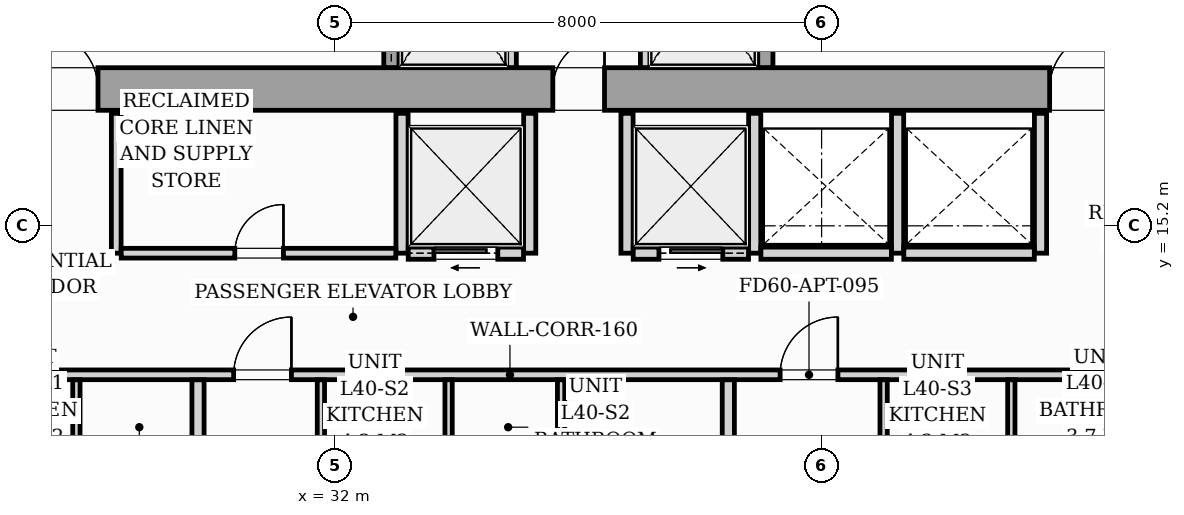
"""IFC4 building model, lengths in metres.
Left out: names, types, materials, properties, quantities, classifications, styles, units other than length and angle.
Written with IfcOpenShell. Run it as: python <this file> out.ifc"""

import sys

from ifc_helpers import new_model, si_unit, direction, frame, frame_2d, origin, origin_2d, place, context, subcontext, project, spatial, rectangle, i_section, extrude, source, transform, mapped, element, fill, save


model = new_model("IFC4")
c1 = context("Model", 3, precision=1e-05, world=origin(), true_north=direction((0.0, 1.0)))
c2 = subcontext(c1, "Body", "Model", "MODEL_VIEW")
j1 = project(units=[si_unit("LENGTHUNIT", "METRE"), si_unit("PLANEANGLEUNIT", "RADIAN")], contexts=[c1])
p1 = place(None, origin())
s1 = spatial("IfcSite", under=j1, at=p1, CompositionType="ELEMENT")
p2 = place(p1, origin())
s2 = spatial("IfcBuilding", under=s1, at=p2, CompositionType="ELEMENT")
p3 = place(p2, frame((0.0, 0.0, 140.6)))
s3 = spatial("IfcBuildingStorey", under=s2, at=p3, CompositionType="ELEMENT", Elevation=140.6)
m1 = source(origin(), c2, "Body", "SweptSolid", [
    extrude(i_section(OverallWidth=0.421, OverallDepth=0.465, WebThickness=0.045, FlangeThickness=0.073, FilletRadius=0.018, at=origin_2d()), origin(), (0.0, 0.0, 1.0), 3.196),
])
for number, where, z_axis, x_axis in (
    (1, (33.12, 17.4, 0.002), (0.0, 0.0, 1.0), (1.0, 0.0, 0.0)),
    (2, (38.88, 17.4, 0.002), (0.0, 0.0, 1.0), (1.0, 0.0, 0.0)),
):
    element("IfcColumn", number, at=place(p3, frame(where, z_axis=z_axis, x_axis=x_axis)), inside=s3, PredefinedType="PILASTER", context=c2, shape_type="MappedRepresentation", body=[
        mapped(m1, transform((0.0, 0.0, 0.0), scale=1.0)),
    ])
p4 = place(p3, frame((26.1, 17.45, 0.0), z_axis=(0.0, 0.0, 1.0), x_axis=(1.0, 0.0, 0.0)))
e3 = element("IfcWall", 3, at=p4, inside=s3, PredefinedType="SHEAR", context=c2, shape_type="SweptSolid", body=[
    extrude(rectangle(XDim=19.8, YDim=0.7, at=frame_2d((9.9, 0.0))), origin(), (0.0, 0.0, 1.0), 3.2),
])
p5 = place(p4, frame((1.05, 0.0, 0.0)))
e4 = element("IfcOpeningElement", 4, at=p5, cuts=e3, PredefinedType="OPENING", context=c2, shape_type="SweptSolid", body=[
    extrude(rectangle(XDim=0.95, YDim=2.06, at=frame_2d((0.475, 1.03))), frame((0.0, 0.36, 0.0), z_axis=(0.0, -1.0, 0.0), x_axis=(1.0, 0.0, 0.0)), (0.0, 0.0, 1.0), 0.72),
])
p6 = place(p4, frame((9.48, 0.0, 0.0)))
e5 = element("IfcOpeningElement", 5, at=p6, cuts=e3, PredefinedType="OPENING", context=c2, shape_type="SweptSolid", body=[
    extrude(rectangle(XDim=0.85, YDim=2.0, at=frame_2d((0.425, 1.0))), frame((0.0, 0.36, 0.0), z_axis=(0.0, -1.0, 0.0), x_axis=(1.0, 0.0, 0.0)), (0.0, 0.0, 1.0), 0.72),
])
p7 = place(p4, frame((17.65, 0.0, 0.0)))
e6 = element("IfcOpeningElement", 6, at=p7, cuts=e3, PredefinedType="OPENING", context=c2, shape_type="SweptSolid", body=[
    extrude(rectangle(XDim=0.95, YDim=2.06, at=frame_2d((0.475, 1.03))), frame((0.0, 0.36, 0.0), z_axis=(0.0, -1.0, 0.0), x_axis=(1.0, 0.0, 0.0)), (0.0, 0.0, 1.0), 0.72),
])
p8 = place(p3, frame((32.925, 17.802, 0.0), z_axis=(0.0, 0.0, 1.0), x_axis=(0.0, 1.0, 0.0)))
e7 = element("IfcWall", 7, at=p8, inside=s3, PredefinedType="SOLIDWALL", context=c2, shape_type="SweptSolid", body=[
    extrude(rectangle(XDim=2.646, YDim=0.25, at=frame_2d((1.323, 0.0))), origin(), (0.0, 0.0, 1.0), 3.2),
])
p9 = place(p8, frame((0.598, 0.0, 0.0)))
e8 = element("IfcOpeningElement", 8, at=p9, cuts=e7, PredefinedType="OPENING", context=c2, shape_type="SweptSolid", body=[
    extrude(rectangle(XDim=1.1, YDim=2.08, at=frame_2d((0.55, 1.04))), frame((0.0, 0.135, 0.0), z_axis=(0.0, -1.0, 0.0), x_axis=(1.0, 0.0, 0.0)), (0.0, 0.0, 1.0), 0.27),
])
for number, where, z_axis, x_axis in (
    (9, (34.9, 17.802, 0.0), (0.0, 0.0, 1.0), (0.0, 1.0, 0.0)),
    (10, (37.1, 17.802, 0.0), (0.0, 0.0, 1.0), (0.0, 1.0, 0.0)),
):
    element("IfcWall", number, at=place(p3, frame(where, z_axis=z_axis, x_axis=x_axis)), inside=s3, PredefinedType="PARTITIONING", context=c2, shape_type="SweptSolid", body=[
        extrude(rectangle(XDim=2.646, YDim=0.16, at=frame_2d((1.323, 0.0))), origin(), (0.0, 0.0, 1.0), 2.94),
    ])
p10 = place(p3, frame((39.075, 17.802, 0.0), z_axis=(0.0, 0.0, 1.0), x_axis=(0.0, 1.0, 0.0)))
e11 = element("IfcWall", 11, at=p10, inside=s3, PredefinedType="SOLIDWALL", context=c2, shape_type="SweptSolid", body=[
    extrude(rectangle(XDim=2.646, YDim=0.25, at=frame_2d((1.323, 0.0))), origin(), (0.0, 0.0, 1.0), 3.2),
])
p11 = place(p10, frame((0.598, 0.0, 0.0)))
e12 = element("IfcOpeningElement", 12, at=p11, cuts=e11, PredefinedType="OPENING", context=c2, shape_type="SweptSolid", body=[
    extrude(rectangle(XDim=1.1, YDim=2.08, at=frame_2d((0.55, 1.04))), frame((0.0, 0.135, 0.0), z_axis=(0.0, -1.0, 0.0), x_axis=(1.0, 0.0, 0.0)), (0.0, 0.0, 1.0), 0.27),
])
p12 = place(p3, frame((28.4, 14.75, 0.0), z_axis=(0.0, 0.0, 1.0), x_axis=(0.0, 1.0, 0.0)))
e13 = element("IfcWall", 13, at=p12, inside=s3, PredefinedType="PARTITIONING", context=c2, shape_type="SweptSolid", body=[
    extrude(rectangle(XDim=2.3, YDim=0.16, at=frame_2d((1.15, 0.0))), origin(), (0.0, 0.0, 1.0), 2.94),
])
p13 = place(p3, frame((33.1, 14.75, 0.0), z_axis=(0.0, 0.0, 1.0), x_axis=(0.0, 1.0, 0.0)))
e14 = element("IfcWall", 14, at=p13, inside=s3, PredefinedType="PARTITIONING", context=c2, shape_type="SweptSolid", body=[
    extrude(rectangle(XDim=2.3, YDim=0.2, at=frame_2d((1.15, 0.0))), origin(), (0.0, 0.0, 1.0), 2.94),
])
p14 = place(p3, frame((28.482, 14.75, 0.0), z_axis=(0.0, 0.0, 1.0), x_axis=(1.0, 0.0, 0.0)))
e15 = element("IfcWall", 15, at=p14, inside=s3, PredefinedType="PARTITIONING", context=c2, shape_type="SweptSolid", body=[
    extrude(rectangle(XDim=4.516, YDim=0.16, at=frame_2d((2.258, 0.0))), origin(), (0.0, 0.0, 1.0), 2.94),
])
p15 = place(p14, frame((1.868, 0.0, 0.0)))
e16 = element("IfcOpeningElement", 16, at=p15, cuts=e15, PredefinedType="OPENING", context=c2, shape_type="SweptSolid", body=[
    extrude(rectangle(XDim=0.8, YDim=2.05, at=frame_2d((0.4, 1.025))), frame((0.0, 0.09, 0.0), z_axis=(0.0, -1.0, 0.0), x_axis=(1.0, 0.0, 0.0)), (0.0, 0.0, 1.0), 0.18),
])
p16 = place(p3, frame((35.2, 14.75, 0.0), z_axis=(0.0, 0.0, 1.0), x_axis=(0.0, 1.0, 0.0)))
e17 = element("IfcWall", 17, at=p16, inside=s3, PredefinedType="PARTITIONING", context=c2, shape_type="SweptSolid", body=[
    extrude(rectangle(XDim=2.3, YDim=0.2, at=frame_2d((1.15, 0.0))), origin(), (0.0, 0.0, 1.0), 2.94),
])
p17 = place(p3, frame((33.202, 14.75, 0.0), z_axis=(0.0, 0.0, 1.0), x_axis=(1.0, 0.0, 0.0)))
e18 = element("IfcWall", 18, at=p17, inside=s3, PredefinedType="PARTITIONING", context=c2, shape_type="SweptSolid", body=[
    extrude(rectangle(XDim=1.896, YDim=0.2, at=frame_2d((0.948, 0.0))), origin(), (0.0, 0.0, 1.0), 2.94),
])
p18 = place(p17, frame((0.423, 0.0, 0.0)))
e19 = element("IfcOpeningElement", 19, at=p18, cuts=e18, PredefinedType="OPENING", context=c2, shape_type="SweptSolid", body=[
    extrude(rectangle(XDim=1.05, YDim=2.08, at=frame_2d((0.525, 1.04))), frame((0.0, 0.11, 0.0), z_axis=(0.0, -1.0, 0.0), x_axis=(1.0, 0.0, 0.0)), (0.0, 0.0, 1.0), 0.22),
])
for number, where, z_axis, x_axis in (
    (20, (36.8, 14.75, 0.0), (0.0, 0.0, 1.0), (0.0, 1.0, 0.0)),
    (21, (38.9, 14.75, 0.0), (0.0, 0.0, 1.0), (0.0, 1.0, 0.0)),
):
    element("IfcWall", number, at=place(p3, frame(where, z_axis=z_axis, x_axis=x_axis)), inside=s3, PredefinedType="PARTITIONING", context=c2, shape_type="SweptSolid", body=[
        extrude(rectangle(XDim=2.3, YDim=0.2, at=frame_2d((1.15, 0.0))), origin(), (0.0, 0.0, 1.0), 2.94),
    ])
p19 = place(p3, frame((36.902, 14.75, 0.0), z_axis=(0.0, 0.0, 1.0), x_axis=(1.0, 0.0, 0.0)))
e22 = element("IfcWall", 22, at=p19, inside=s3, PredefinedType="PARTITIONING", context=c2, shape_type="SweptSolid", body=[
    extrude(rectangle(XDim=1.896, YDim=0.2, at=frame_2d((0.948, 0.0))), origin(), (0.0, 0.0, 1.0), 2.94),
])
p20 = place(p19, frame((0.423, 0.0, 0.0)))
e23 = element("IfcOpeningElement", 23, at=p20, cuts=e22, PredefinedType="OPENING", context=c2, shape_type="SweptSolid", body=[
    extrude(rectangle(XDim=1.05, YDim=2.08, at=frame_2d((0.525, 1.04))), frame((0.0, 0.11, 0.0), z_axis=(0.0, -1.0, 0.0), x_axis=(1.0, 0.0, 0.0)), (0.0, 0.0, 1.0), 0.22),
])
for number, where, z_axis, x_axis in (
    (24, (41.25, 14.75, 0.0), (0.0, 0.0, 1.0), (0.0, 1.0, 0.0)),
    (25, (43.6, 14.75, 0.0), (0.0, 0.0, 1.0), (0.0, 1.0, 0.0)),
):
    element("IfcWall", number, at=place(p3, frame(where, z_axis=z_axis, x_axis=x_axis)), inside=s3, PredefinedType="PARTITIONING", context=c2, shape_type="SweptSolid", body=[
        extrude(rectangle(XDim=2.3, YDim=0.2, at=frame_2d((1.15, 0.0))), origin(), (0.0, 0.0, 1.0), 2.94),
    ])
for number, where, z_axis, x_axis in (
    (26, (39.002, 14.75, 0.0), (0.0, 0.0, 1.0), (1.0, 0.0, 0.0)),
    (27, (41.352, 14.75, 0.0), (0.0, 0.0, 1.0), (1.0, 0.0, 0.0)),
):
    element("IfcWall", number, at=place(p3, frame(where, z_axis=z_axis, x_axis=x_axis)), inside=s3, PredefinedType="PARTITIONING", context=c2, shape_type="SweptSolid", body=[
        extrude(rectangle(XDim=2.146, YDim=0.2, at=frame_2d((1.073, 0.0))), origin(), (0.0, 0.0, 1.0), 2.94),
    ])
p21 = place(p3, frame((22.05, 12.75, 0.0), z_axis=(0.0, 0.0, 1.0), x_axis=(1.0, 0.0, 0.0)))
e28 = element("IfcWall", 28, at=p21, inside=s3, PredefinedType="PARTITIONING", context=c2, shape_type="SweptSolid", body=[
    extrude(rectangle(XDim=25.65, YDim=0.16, at=frame_2d((12.825, 0.0))), origin(), (0.0, 0.0, 1.0), 2.94),
])
p22 = place(p21, frame((1.312, 0.0, 0.0)))
e29 = element("IfcOpeningElement", 29, at=p22, cuts=e28, PredefinedType="OPENING", context=c2, shape_type="SweptSolid", body=[
    extrude(rectangle(XDim=0.95, YDim=2.06, at=frame_2d((0.475, 1.03))), frame((0.0, 0.09, 0.0), z_axis=(0.0, -1.0, 0.0), x_axis=(1.0, 0.0, 0.0)), (0.0, 0.0, 1.0), 0.18),
])
p23 = place(p21, frame((8.281, 0.0, 0.0)))
e30 = element("IfcOpeningElement", 30, at=p23, cuts=e28, PredefinedType="OPENING", context=c2, shape_type="SweptSolid", body=[
    extrude(rectangle(XDim=0.95, YDim=2.06, at=frame_2d((0.475, 1.03))), frame((0.0, 0.09, 0.0), z_axis=(0.0, -1.0, 0.0), x_axis=(1.0, 0.0, 0.0)), (0.0, 0.0, 1.0), 0.18),
])
p24 = place(p21, frame((17.268, 0.0, 0.0)))
e31 = element("IfcOpeningElement", 31, at=p24, cuts=e28, PredefinedType="OPENING", context=c2, shape_type="SweptSolid", body=[
    extrude(rectangle(XDim=0.95, YDim=2.06, at=frame_2d((0.475, 1.03))), frame((0.0, 0.09, 0.0), z_axis=(0.0, -1.0, 0.0), x_axis=(1.0, 0.0, 0.0)), (0.0, 0.0, 1.0), 0.18),
])
p25 = place(p3, frame((27.745, 10.562, 0.0), z_axis=(0.0, 0.0, 1.0), x_axis=(0.0, 1.0, 0.0)))
e32 = element("IfcWall", 32, at=p25, inside=s3, PredefinedType="PARTITIONING", context=c2, shape_type="SweptSolid", body=[
    extrude(rectangle(XDim=2.106, YDim=0.12, at=frame_2d((1.053, 0.0))), origin(), (0.0, 0.0, 1.0), 2.94),
])
p26 = place(p3, frame((29.745, 10.562, 0.0), z_axis=(0.0, 0.0, 1.0), x_axis=(0.0, 1.0, 0.0)))
e33 = element("IfcWall", 33, at=p26, inside=s3, PredefinedType="PARTITIONING", context=c2, shape_type="SweptSolid", body=[
    extrude(rectangle(XDim=2.106, YDim=0.2, at=frame_2d((1.053, 0.0))), origin(), (0.0, 0.0, 1.0), 2.94),
])
p27 = place(p3, frame((35.716, 6.754, 0.0), z_axis=(0.0, 0.0, 1.0), x_axis=(0.0, 1.0, 0.0)))
e34 = element("IfcWall", 34, at=p27, inside=s3, PredefinedType="PARTITIONING", context=c2, shape_type="SweptSolid", body=[
    extrude(rectangle(XDim=5.914, YDim=0.12, at=frame_2d((2.957, 0.0))), origin(), (0.0, 0.0, 1.0), 2.94),
])
p28 = place(p27, frame((2.646, 0.0, 0.0)))
e35 = element("IfcOpeningElement", 35, at=p28, cuts=e34, PredefinedType="OPENING", context=c2, shape_type="SweptSolid", body=[
    extrude(rectangle(XDim=0.9, YDim=2.05, at=frame_2d((0.45, 1.025))), frame((0.0, 0.07, 0.0), z_axis=(0.0, -1.0, 0.0), x_axis=(1.0, 0.0, 0.0)), (0.0, 0.0, 1.0), 0.14),
])
for number, where, z_axis, x_axis in (
    (36, (33.866, 10.562, 0.0), (0.0, 0.0, 1.0), (0.0, 1.0, 0.0)),
    (37, (31.766, 10.562, 0.0), (0.0, 0.0, 1.0), (0.0, 1.0, 0.0)),
):
    element("IfcWall", number, at=place(p3, frame(where, z_axis=z_axis, x_axis=x_axis)), inside=s3, PredefinedType="PARTITIONING", context=c2, shape_type="SweptSolid", body=[
        extrude(rectangle(XDim=2.106, YDim=0.12, at=frame_2d((1.053, 0.0))), origin(), (0.0, 0.0, 1.0), 2.94),
    ])
p29 = place(p3, frame((38.466, 6.49, 0.0), z_axis=(0.0, 0.0, 1.0), x_axis=(0.0, 1.0, 0.0)))
e38 = element("IfcWall", 38, at=p29, inside=s3, PredefinedType="PARTITIONING", context=c2, shape_type="SweptSolid", body=[
    extrude(rectangle(XDim=6.178, YDim=0.2, at=frame_2d((3.089, 0.0))), origin(), (0.0, 0.0, 1.0), 2.94),
])
for number, where, z_axis, x_axis in (
    (39, (43.12, 10.562, 0.0), (0.0, 0.0, 1.0), (0.0, 1.0, 0.0)),
    (40, (41.02, 10.562, 0.0), (0.0, 0.0, 1.0), (0.0, 1.0, 0.0)),
):
    element("IfcWall", number, at=place(p3, frame(where, z_axis=z_axis, x_axis=x_axis)), inside=s3, PredefinedType="PARTITIONING", context=c2, shape_type="SweptSolid", body=[
        extrude(rectangle(XDim=2.106, YDim=0.12, at=frame_2d((1.053, 0.0))), origin(), (0.0, 0.0, 1.0), 2.94),
    ])
m2 = source(origin(), c2, "Body", "SweptSolid", [
    extrude(rectangle(XDim=0.95, YDim=2.06, at=frame_2d((0.475, 1.03))), frame((0.0, 0.025, 0.0), z_axis=(0.0, -1.0, 0.0), x_axis=(1.0, 0.0, 0.0)), (0.0, 0.0, 1.0), 0.05),
])
p30 = place(p5, origin())
e41 = element("IfcDoor", 41, at=p30, inside=s3, OperationType="SINGLE_SWING_LEFT", PredefinedType="DOOR", context=c2, shape_type="MappedRepresentation", body=[
    mapped(m2, transform((0.0, 0.0, 0.0), scale=1.0)),
])
fill(e4, e41)
m3 = source(origin(), c2, "Body", "SweptSolid", [
    extrude(rectangle(XDim=0.85, YDim=2.0, at=frame_2d((0.425, 1.0))), frame((0.0, 0.025, 0.0), z_axis=(0.0, -1.0, 0.0), x_axis=(1.0, 0.0, 0.0)), (0.0, 0.0, 1.0), 0.05),
])
p31 = place(p6, origin())
e42 = element("IfcDoor", 42, at=p31, inside=s3, OperationType="SINGLE_SWING_RIGHT", PredefinedType="DOOR", context=c2, shape_type="MappedRepresentation", body=[
    mapped(m3, transform((0.0, 0.0, 0.0), scale=1.0)),
])
fill(e5, e42)
p32 = place(p7, origin())
e43 = element("IfcDoor", 43, at=p32, inside=s3, OperationType="SINGLE_SWING_RIGHT", PredefinedType="DOOR", context=c2, shape_type="MappedRepresentation", body=[
    mapped(m2, transform((0.0, 0.0, 0.0), scale=1.0)),
])
fill(e6, e43)
m4 = source(origin(), c2, "Body", "SweptSolid", [
    extrude(rectangle(XDim=0.8, YDim=2.05, at=frame_2d((0.4, 1.025))), frame((0.0, 0.025, 0.0), z_axis=(0.0, -1.0, 0.0), x_axis=(1.0, 0.0, 0.0)), (0.0, 0.0, 1.0), 0.05),
])
p33 = place(p15, origin())
e44 = element("IfcDoor", 44, at=p33, inside=s3, OperationType="SINGLE_SWING_RIGHT", PredefinedType="DOOR", context=c2, shape_type="MappedRepresentation", body=[
    mapped(m4, transform((0.0, 0.0, 0.0), scale=1.0)),
])
fill(e16, e44)
m5 = source(origin(), c2, "Body", "SweptSolid", [
    extrude(rectangle(XDim=1.05, YDim=2.08, at=frame_2d((0.525, 1.04))), frame((0.0, 0.025, 0.0), z_axis=(0.0, -1.0, 0.0), x_axis=(1.0, 0.0, 0.0)), (0.0, 0.0, 1.0), 0.05),
])
p34 = place(p18, origin())
e45 = element("IfcDoor", 45, at=p34, inside=s3, OperationType="SLIDING_TO_LEFT", PredefinedType="DOOR", context=c2, shape_type="MappedRepresentation", body=[
    mapped(m5, transform((0.0, 0.0, 0.0), scale=1.0)),
])
fill(e19, e45)
p35 = place(p20, origin())
e46 = element("IfcDoor", 46, at=p35, inside=s3, OperationType="SLIDING_TO_RIGHT", PredefinedType="DOOR", context=c2, shape_type="MappedRepresentation", body=[
    mapped(m5, transform((0.0, 0.0, 0.0), scale=1.0)),
])
fill(e23, e46)
m6 = source(origin(), c2, "Body", "SweptSolid", [
    extrude(rectangle(XDim=0.95, YDim=2.06, at=frame_2d((0.475, 1.03))), frame((0.0, 0.025, 0.0), z_axis=(0.0, -1.0, 0.0), x_axis=(1.0, 0.0, 0.0)), (0.0, 0.0, 1.0), 0.05),
])
p36 = place(p23, origin())
e47 = element("IfcDoor", 47, at=p36, inside=s3, OperationType="SINGLE_SWING_RIGHT", PredefinedType="DOOR", context=c2, shape_type="MappedRepresentation", body=[
    mapped(m6, transform((0.0, 0.0, 0.0), scale=1.0)),
])
fill(e30, e47)
p37 = place(p24, origin())
e48 = element("IfcDoor", 48, at=p37, inside=s3, OperationType="SINGLE_SWING_RIGHT", PredefinedType="DOOR", context=c2, shape_type="MappedRepresentation", body=[
    mapped(m6, transform((0.0, 0.0, 0.0), scale=1.0)),
])
fill(e31, e48)
save(model, sys.argv[1])
